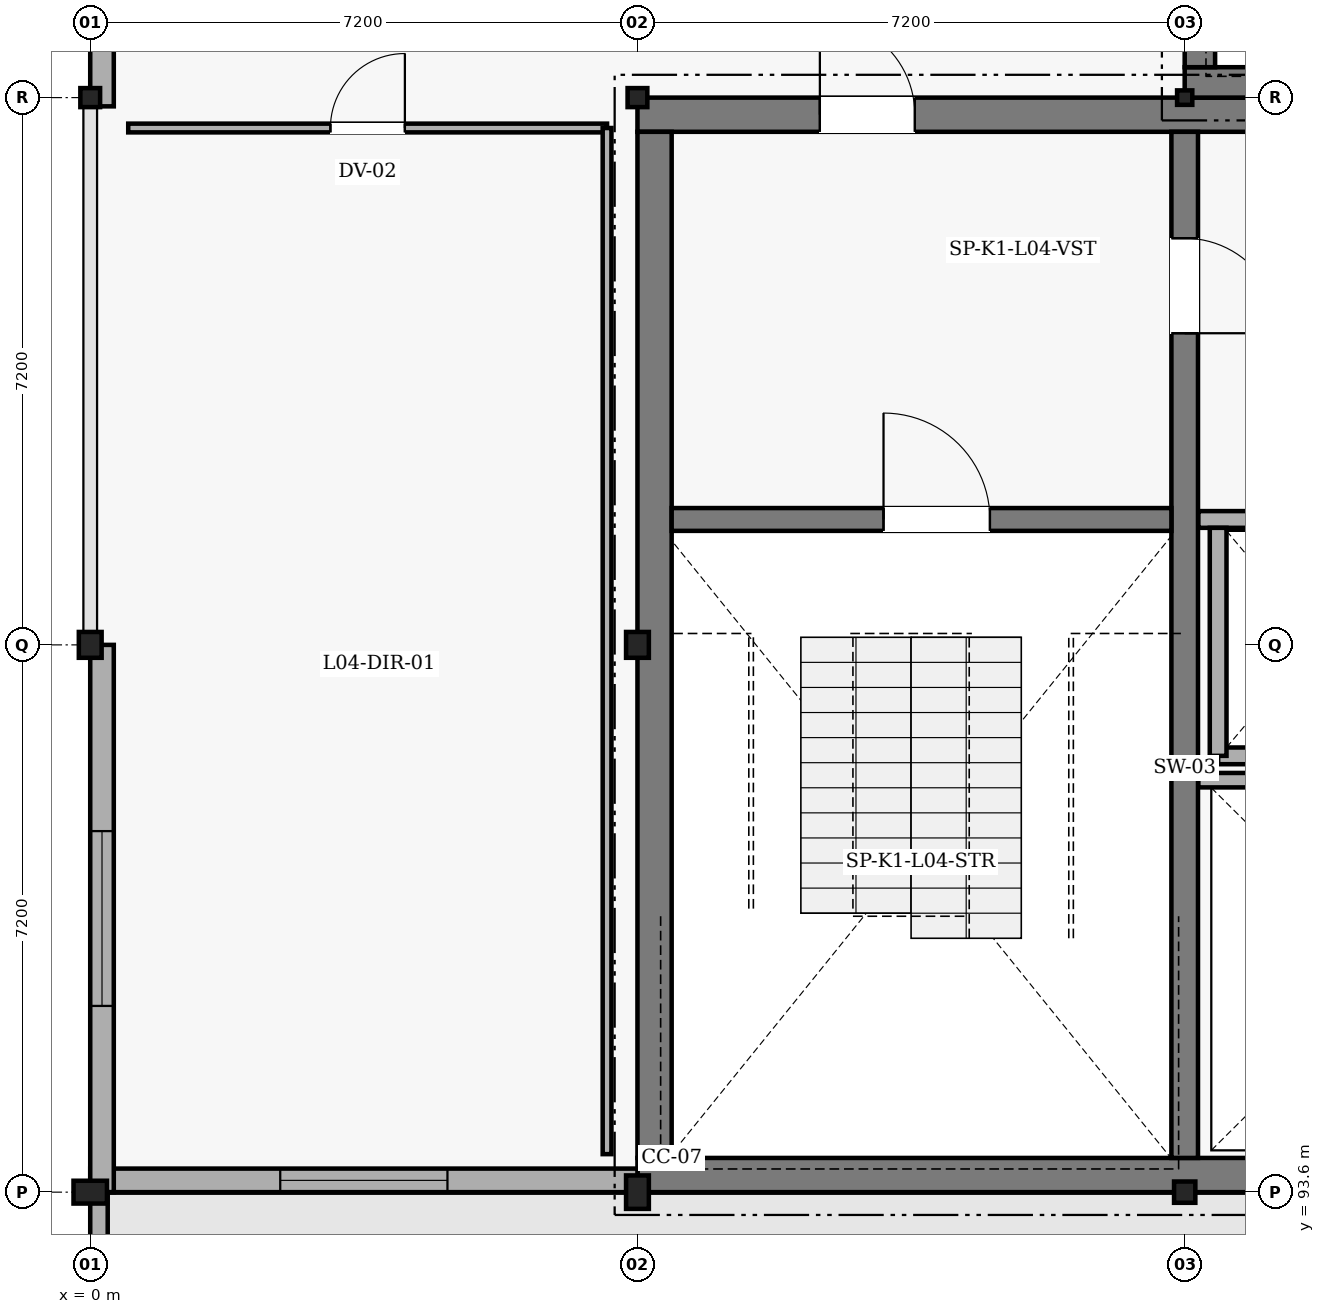
"""IFC4 building model, lengths in metres.
Left out: names, types, materials, properties, quantities, classifications, styles, units other than length and angle.
Written with IfcOpenShell. Run it as: python <this file> out.ifc"""

import sys

from ifc_helpers import new_model, si_unit, direction, frame, frame_2d, origin, origin_2d, place, context, subcontext, project, spatial, rectangle, i_section, extrude, element, fill, save


model = new_model("IFC4")
c1 = context("Model", 3, precision=1e-05, world=origin(), true_north=direction((0.0, 1.0)))
c2 = subcontext(c1, "Body", "Model", "MODEL_VIEW")
j1 = project(units=[si_unit("LENGTHUNIT", "METRE"), si_unit("PLANEANGLEUNIT", "RADIAN")], contexts=[c1])
p1 = place(None, origin())
s1 = spatial("IfcSite", under=j1, at=p1, CompositionType="ELEMENT")
p2 = place(p1, origin())
s2 = spatial("IfcBuilding", under=s1, at=p2, CompositionType="ELEMENT")
p3 = place(p2, frame((0.0, 0.0, 18.0)))
s3 = spatial("IfcBuildingStorey", under=s2, at=p3, CompositionType="ELEMENT", Elevation=18.0)
p4 = place(p3, frame((7.2, 107.775, 0.0), z_axis=(0.0, 0.0, 1.0), x_axis=(1.0, 0.0, 0.0)))
e1 = element("IfcWall", 1, at=p4, inside=s3, PredefinedType="SHEAR", context=c2, shape_type="SweptSolid", body=[
    extrude(rectangle(XDim=14.4, YDim=0.45, at=frame_2d((7.2, 0.0))), origin(), (0.0, 0.0, 1.0), 3.6),
])
p5 = place(p4, frame((2.4, 0.0, 0.0)))
e2 = element("IfcOpeningElement", 2, at=p5, cuts=e1, PredefinedType="OPENING", context=c2, shape_type="SweptSolid", body=[
    extrude(rectangle(XDim=1.25, YDim=2.2, at=frame_2d((0.625, 1.1))), frame((0.0, 0.235, 0.0), z_axis=(0.0, -1.0, 0.0), x_axis=(1.0, 0.0, 0.0)), (0.0, 0.0, 1.0), 0.47),
])
p6 = place(p3, frame((21.6, 93.825, 0.0), z_axis=(0.0, 0.0, 1.0), x_axis=(-1.0, 0.0, 0.0)))
e3 = element("IfcWall", 3, at=p6, inside=s3, PredefinedType="SHEAR", context=c2, shape_type="SweptSolid", body=[
    extrude(rectangle(XDim=14.4, YDim=0.45, at=frame_2d((7.2, 0.0))), origin(), (0.0, 0.0, 1.0), 3.6),
])
p7 = place(p3, frame((7.425, 94.05, 0.0), z_axis=(0.0, 0.0, 1.0), x_axis=(0.0, 1.0, 0.0)))
e4 = element("IfcWall", 4, at=p7, inside=s3, PredefinedType="SHEAR", context=c2, shape_type="SweptSolid", body=[
    extrude(rectangle(XDim=13.5, YDim=0.45, at=frame_2d((6.75, 0.0))), origin(), (0.0, 0.0, 1.0), 3.6),
])
p8 = place(p3, frame((14.4, 107.55, 0.0), z_axis=(0.0, 0.0, 1.0), x_axis=(0.0, -1.0, 0.0)))
e5 = element("IfcWall", 5, at=p8, inside=s3, PredefinedType="SHEAR", context=c2, shape_type="SweptSolid", body=[
    extrude(rectangle(XDim=13.5, YDim=0.35, at=frame_2d((6.75, 0.0))), origin(), (0.0, 0.0, 1.0), 3.6),
])
p9 = place(p8, frame((1.4, 0.0, 0.0)))
e6 = element("IfcOpeningElement", 6, at=p9, cuts=e5, PredefinedType="OPENING", context=c2, shape_type="SweptSolid", body=[
    extrude(rectangle(XDim=1.25, YDim=2.2, at=frame_2d((0.625, 1.1))), frame((0.0, 0.185, 0.0), z_axis=(0.0, -1.0, 0.0), x_axis=(1.0, 0.0, 0.0)), (0.0, 0.0, 1.0), 0.37),
])
p10 = place(p3, frame((7.65, 102.45, 0.0), z_axis=(0.0, 0.0, 1.0), x_axis=(1.0, 0.0, 0.0)))
e7 = element("IfcWall", 7, at=p10, inside=s3, PredefinedType="SHEAR", context=c2, shape_type="SweptSolid", body=[
    extrude(rectangle(XDim=6.575, YDim=0.3, at=frame_2d((3.288, 0.0))), origin(), (0.0, 0.0, 1.0), 3.6),
])
p11 = place(p10, frame((2.788, 0.0, 0.0)))
e8 = element("IfcOpeningElement", 8, at=p11, cuts=e7, PredefinedType="OPENING", context=c2, shape_type="SweptSolid", body=[
    extrude(rectangle(XDim=1.4, YDim=2.2, at=frame_2d((0.7, 1.1))), frame((0.0, 0.16, 0.0), z_axis=(0.0, -1.0, 0.0), x_axis=(1.0, 0.0, 0.0)), (0.0, 0.0, 1.0), 0.32),
])
p12 = place(p3, frame((21.6, 108.2, 0.0), z_axis=(0.0, 0.0, 1.0), x_axis=(-1.0, 0.0, 0.0)))
e9 = element("IfcWall", 9, at=p12, inside=s3, PredefinedType="SHEAR", context=c2, shape_type="SweptSolid", body=[
    extrude(rectangle(XDim=7.2, YDim=0.4, at=frame_2d((3.6, 0.0))), origin(), (0.0, 0.0, 1.0), 3.6),
])
p13 = place(p3, frame((14.6, 108.4, 0.0), z_axis=(0.0, 0.0, 1.0), x_axis=(0.0, 1.0, 0.0)))
e10 = element("IfcWall", 10, at=p13, inside=s3, PredefinedType="SHEAR", context=c2, shape_type="SweptSolid", body=[
    extrude(rectangle(XDim=13.6, YDim=0.4, at=frame_2d((6.8, 0.0))), origin(), (0.0, 0.0, 1.0), 3.6),
])
p14 = place(p13, frame((9.8, 0.0, 0.0)))
e11 = element("IfcOpeningElement", 11, at=p14, cuts=e10, PredefinedType="OPENING", context=c2, shape_type="SweptSolid", body=[
    extrude(rectangle(XDim=1.25, YDim=2.2, at=frame_2d((0.625, 1.1))), frame((0.0, 0.21, 0.0), z_axis=(0.0, -1.0, 0.0), x_axis=(1.0, 0.0, 0.0)), (0.0, 0.0, 1.0), 0.42),
])
p15 = place(p3, frame((0.0, 93.6, 0.0), z_axis=(0.0, 0.0, 1.0), x_axis=(0.0, 1.0, 0.0)))
e12 = element("IfcColumn", 12, at=p15, inside=s3, PredefinedType="COLUMN", context=c2, shape_type="SweptSolid", body=[
    extrude(i_section(OverallWidth=0.3, OverallDepth=0.44, WebThickness=0.011, FlangeThickness=0.021, FilletRadius=0.027, at=origin_2d()), origin(), (0.0, 0.0, 1.0), 3.3),
])
p16 = place(p3, frame((0.0, 100.8, 0.0), z_axis=(0.0, 0.0, 1.0), x_axis=(1.0, 0.0, 0.0)))
e13 = element("IfcColumn", 13, at=p16, inside=s3, PredefinedType="COLUMN", context=c2, shape_type="SweptSolid", body=[
    extrude(i_section(OverallWidth=0.3, OverallDepth=0.34, WebThickness=0.012, FlangeThickness=0.021, FilletRadius=0.027, at=origin_2d()), origin(), (0.0, 0.0, 1.0), 3.3),
])
p17 = place(p3, frame((0.0, 108.0, 0.0), z_axis=(0.0, 0.0, 1.0), x_axis=(1.0, 0.0, 0.0)))
e14 = element("IfcColumn", 14, at=p17, inside=s3, PredefinedType="COLUMN", context=c2, shape_type="SweptSolid", body=[
    extrude(i_section(OverallWidth=0.26, OverallDepth=0.25, WebThickness=0.008, FlangeThickness=0.012, FilletRadius=0.024, at=origin_2d()), origin(), (0.0, 0.0, 1.0), 3.3),
])
p18 = place(p3, frame((7.2, 93.6, 0.0), z_axis=(0.0, 0.0, 1.0), x_axis=(1.0, 0.0, 0.0)))
e15 = element("IfcColumn", 15, at=p18, inside=s3, PredefinedType="COLUMN", context=c2, shape_type="SweptSolid", body=[
    extrude(i_section(OverallWidth=0.3, OverallDepth=0.44, WebThickness=0.011, FlangeThickness=0.021, FilletRadius=0.027, at=origin_2d()), origin(), (0.0, 0.0, 1.0), 3.3),
])
p19 = place(p3, frame((7.2, 100.8, 0.0), z_axis=(0.0, 0.0, 1.0), x_axis=(1.0, 0.0, 0.0)))
e16 = element("IfcColumn", 16, at=p19, inside=s3, PredefinedType="COLUMN", context=c2, shape_type="SweptSolid", body=[
    extrude(i_section(OverallWidth=0.3, OverallDepth=0.34, WebThickness=0.012, FlangeThickness=0.021, FilletRadius=0.027, at=origin_2d()), origin(), (0.0, 0.0, 1.0), 3.3),
])
p20 = place(p3, frame((7.2, 108.0, 0.0), z_axis=(0.0, 0.0, 1.0), x_axis=(1.0, 0.0, 0.0)))
e17 = element("IfcColumn", 17, at=p20, inside=s3, PredefinedType="COLUMN", context=c2, shape_type="SweptSolid", body=[
    extrude(i_section(OverallWidth=0.26, OverallDepth=0.25, WebThickness=0.008, FlangeThickness=0.012, FilletRadius=0.024, at=origin_2d()), origin(), (0.0, 0.0, 1.0), 3.3),
])
p21 = place(p3, frame((14.4, 93.6, 0.0), z_axis=(0.0, 0.0, 1.0), x_axis=(1.0, 0.0, 0.0)))
e18 = element("IfcColumn", 18, at=p21, inside=s3, PredefinedType="COLUMN", context=c2, shape_type="SweptSolid", body=[
    extrude(i_section(OverallWidth=0.28, OverallDepth=0.28, WebThickness=0.01, FlangeThickness=0.018, FilletRadius=0.024, at=origin_2d()), origin(), (0.0, 0.0, 1.0), 3.3),
])
p22 = place(p3, frame((14.4, 108.0, 0.0), z_axis=(0.0, 0.0, 1.0), x_axis=(1.0, 0.0, 0.0)))
e19 = element("IfcColumn", 19, at=p22, inside=s3, PredefinedType="COLUMN", context=c2, shape_type="SweptSolid", body=[
    extrude(i_section(OverallWidth=0.2, OverallDepth=0.19, WebThickness=0.007, FlangeThickness=0.01, FilletRadius=0.018, at=origin_2d()), origin(), (0.0, 0.0, 1.0), 3.3),
])
p23 = place(p3, frame((7.2, 93.755, 0.0), z_axis=(0.0, 0.0, 1.0), x_axis=(-1.0, 0.0, 0.0)))
e20 = element("IfcWall", 20, at=p23, inside=s3, PredefinedType="SOLIDWALL", context=c2, shape_type="SweptSolid", body=[
    extrude(rectangle(XDim=7.2, YDim=0.31, at=frame_2d((3.6, 0.0))), origin(), (0.0, 0.0, 1.0), 3.0),
])
p24 = place(p23, frame((2.5, 0.0, 0.9)))
e21 = element("IfcOpeningElement", 21, at=p24, cuts=e20, PredefinedType="OPENING", context=c2, shape_type="SweptSolid", body=[
    extrude(rectangle(XDim=2.2, YDim=1.7, at=frame_2d((1.1, 0.85))), frame((0.0, 0.165, 0.0), z_axis=(0.0, -1.0, 0.0), x_axis=(1.0, 0.0, 0.0)), (0.0, 0.0, 1.0), 0.33),
])
p25 = place(p3, frame((0.155, 93.6, 0.0), z_axis=(0.0, 0.0, 1.0), x_axis=(0.0, 1.0, 0.0)))
e22 = element("IfcWall", 22, at=p25, inside=s3, PredefinedType="SOLIDWALL", context=c2, shape_type="SweptSolid", body=[
    extrude(rectangle(XDim=7.2, YDim=0.31, at=frame_2d((3.6, 0.0))), origin(), (0.0, 0.0, 1.0), 3.0),
])
p26 = place(p25, frame((2.45, 0.0, 0.9)))
e23 = element("IfcOpeningElement", 23, at=p26, cuts=e22, PredefinedType="OPENING", context=c2, shape_type="SweptSolid", body=[
    extrude(rectangle(XDim=2.3, YDim=1.75, at=frame_2d((1.15, 0.875))), frame((0.0, 0.165, 0.0), z_axis=(0.0, -1.0, 0.0), x_axis=(1.0, 0.0, 0.0)), (0.0, 0.0, 1.0), 0.33),
])
p27 = place(p3, frame((0.155, 107.885, 0.0), z_axis=(0.0, 0.0, 1.0), x_axis=(0.0, 1.0, 0.0)))
e24 = element("IfcWall", 24, at=p27, inside=s3, PredefinedType="SOLIDWALL", context=c2, shape_type="SweptSolid", body=[
    extrude(rectangle(XDim=7.315, YDim=0.31, at=frame_2d((3.657, 0.0))), origin(), (0.0, 0.0, 1.0), 3.0),
])
p28 = place(p27, frame((2.465, 0.0, 0.9)))
e25 = element("IfcOpeningElement", 25, at=p28, cuts=e24, PredefinedType="OPENING", context=c2, shape_type="SweptSolid", body=[
    extrude(rectangle(XDim=2.5, YDim=1.75, at=frame_2d((1.25, 0.875))), frame((0.0, 0.165, 0.0), z_axis=(0.0, -1.0, 0.0), x_axis=(1.0, 0.0, 0.0)), (0.0, 0.0, 1.0), 0.33),
])
p29 = place(p3, frame((0.115, 93.6, 0.0), z_axis=(0.0, 0.0, 1.0), x_axis=(0.0, -1.0, 0.0)))
e26 = element("IfcWall", 26, at=p29, inside=s3, PredefinedType="PARAPET", context=c2, shape_type="SweptSolid", body=[
    extrude(rectangle(XDim=21.6, YDim=0.23, at=frame_2d((10.8, 0.0))), origin(), (0.0, 0.0, 1.0), 0.55),
])
p30 = place(p3, frame((14.58, 99.02, 0.0), z_axis=(0.0, 0.0, 1.0), x_axis=(1.0, 0.0, 0.0)))
e27 = element("IfcWall", 27, at=p30, inside=s3, PredefinedType="PARTITIONING", context=c2, shape_type="SweptSolid", body=[
    extrude(rectangle(XDim=6.57, YDim=0.19, at=frame_2d((3.285, 0.0))), origin(), (0.0, 0.0, 1.0), 3.25),
])
p31 = place(p3, frame((14.58, 102.45, 0.0), z_axis=(0.0, 0.0, 1.0), x_axis=(1.0, 0.0, 0.0)))
e28 = element("IfcWall", 28, at=p31, inside=s3, PredefinedType="PARTITIONING", context=c2, shape_type="SweptSolid", body=[
    extrude(rectangle(XDim=6.57, YDim=0.22, at=frame_2d((3.285, 0.0))), origin(), (0.0, 0.0, 1.0), 3.25),
])
p32 = place(p31, frame((1.02, 0.0, 0.0)))
e29 = element("IfcOpeningElement", 29, at=p32, cuts=e28, PredefinedType="OPENING", context=c2, shape_type="SweptSolid", body=[
    extrude(rectangle(XDim=1.1, YDim=2.15, at=frame_2d((0.55, 1.075))), frame((0.0, 0.12, 0.0), z_axis=(0.0, -1.0, 0.0), x_axis=(1.0, 0.0, 0.0)), (0.0, 0.0, 1.0), 0.24),
])
p33 = place(p31, frame((4.07, 0.0, 0.0)))
e30 = element("IfcOpeningElement", 30, at=p33, cuts=e28, PredefinedType="OPENING", context=c2, shape_type="SweptSolid", body=[
    extrude(rectangle(XDim=1.2, YDim=2.15, at=frame_2d((0.6, 1.075))), frame((0.0, 0.12, 0.0), z_axis=(0.0, -1.0, 0.0), x_axis=(1.0, 0.0, 0.0)), (0.0, 0.0, 1.0), 0.24),
])
p34 = place(p3, frame((14.84, 99.34, 0.0), z_axis=(0.0, 0.0, 1.0), x_axis=(1.0, 0.0, 0.0)))
e31 = element("IfcWall", 31, at=p34, inside=s3, PredefinedType="PARTITIONING", context=c2, shape_type="SweptSolid", body=[
    extrude(rectangle(XDim=2.62, YDim=0.22, at=frame_2d((1.31, 0.0))), origin(), (0.0, 0.0, 1.0), 3.25),
])
p35 = place(p3, frame((14.84, 99.34, 0.0), z_axis=(0.0, 0.0, 1.0), x_axis=(0.0, 1.0, 0.0)))
e32 = element("IfcWall", 32, at=p35, inside=s3, PredefinedType="PARTITIONING", context=c2, shape_type="SweptSolid", body=[
    extrude(rectangle(XDim=3.0, YDim=0.22, at=frame_2d((1.5, 0.0))), origin(), (0.0, 0.0, 1.0), 3.25),
])
p36 = place(p3, frame((0.5, 107.6, 0.0), z_axis=(0.0, 0.0, 1.0), x_axis=(1.0, 0.0, 0.0)))
e33 = element("IfcWall", 33, at=p36, inside=s3, PredefinedType="PARTITIONING", context=c2, shape_type="SweptSolid", body=[
    extrude(rectangle(XDim=6.3, YDim=0.115, at=frame_2d((3.15, 0.0))), origin(), (0.0, 0.0, 1.0), 3.25),
])
p37 = place(p36, frame((2.66, 0.0, 0.0)))
e34 = element("IfcOpeningElement", 34, at=p37, cuts=e33, PredefinedType="OPENING", context=c2, shape_type="SweptSolid", body=[
    extrude(rectangle(XDim=0.98, YDim=2.15, at=frame_2d((0.49, 1.075))), frame((0.0, 0.067, 0.0), z_axis=(0.0, -1.0, 0.0), x_axis=(1.0, 0.0, 0.0)), (0.0, 0.0, 1.0), 0.135),
])
p38 = place(p3, frame((6.8, 107.6, 0.0), z_axis=(0.0, 0.0, 1.0), x_axis=(0.0, -1.0, 0.0)))
e35 = element("IfcWall", 35, at=p38, inside=s3, PredefinedType="PARTITIONING", context=c2, shape_type="SweptSolid", body=[
    extrude(rectangle(XDim=13.5, YDim=0.115, at=frame_2d((6.75, 0.0))), origin(), (0.0, 0.0, 1.0), 2.85),
])
p39 = place(p24, origin())
e36 = element("IfcWindow", 36, at=p39, inside=s3, PartitioningType="SINGLE_PANEL", PredefinedType="WINDOW", context=c2, shape_type="SweptSolid", body=[
    extrude(rectangle(XDim=2.2, YDim=1.7, at=frame_2d((1.1, 0.85))), frame((0.0, 0.03, 0.0), z_axis=(0.0, -1.0, 0.0), x_axis=(1.0, 0.0, 0.0)), (0.0, 0.0, 1.0), 0.06),
])
fill(e21, e36)
p40 = place(p26, origin())
e37 = element("IfcWindow", 37, at=p40, inside=s3, PartitioningType="SINGLE_PANEL", PredefinedType="WINDOW", context=c2, shape_type="SweptSolid", body=[
    extrude(rectangle(XDim=2.3, YDim=1.75, at=frame_2d((1.15, 0.875))), frame((0.0, 0.03, 0.0), z_axis=(0.0, -1.0, 0.0), x_axis=(1.0, 0.0, 0.0)), (0.0, 0.0, 1.0), 0.06),
])
fill(e23, e37)
p41 = place(p11, origin())
e38 = element("IfcDoor", 38, at=p41, inside=s3, OperationType="SINGLE_SWING_LEFT", PredefinedType="DOOR", context=c2, shape_type="SweptSolid", body=[
    extrude(rectangle(XDim=1.4, YDim=2.2, at=frame_2d((0.7, 1.1))), frame((0.0, 0.025, 0.0), z_axis=(0.0, -1.0, 0.0), x_axis=(1.0, 0.0, 0.0)), (0.0, 0.0, 1.0), 0.05),
])
fill(e8, e38)
p42 = place(p9, origin())
e39 = element("IfcDoor", 39, at=p42, inside=s3, OperationType="SINGLE_SWING_RIGHT", PredefinedType="DOOR", context=c2, shape_type="SweptSolid", body=[
    extrude(rectangle(XDim=1.25, YDim=2.2, at=frame_2d((0.625, 1.1))), frame((0.0, 0.025, 0.0), z_axis=(0.0, -1.0, 0.0), x_axis=(1.0, 0.0, 0.0)), (0.0, 0.0, 1.0), 0.05),
])
fill(e6, e39)
p43 = place(p5, origin())
e40 = element("IfcDoor", 40, at=p43, inside=s3, OperationType="SINGLE_SWING_LEFT", PredefinedType="DOOR", context=c2, shape_type="SweptSolid", body=[
    extrude(rectangle(XDim=1.25, YDim=2.2, at=frame_2d((0.625, 1.1))), frame((0.0, 0.025, 0.0), z_axis=(0.0, -1.0, 0.0), x_axis=(1.0, 0.0, 0.0)), (0.0, 0.0, 1.0), 0.05),
])
fill(e2, e40)
p44 = place(p37, origin())
e41 = element("IfcDoor", 41, at=p44, inside=s3, OperationType="SINGLE_SWING_RIGHT", PredefinedType="DOOR", context=c2, shape_type="SweptSolid", body=[
    extrude(rectangle(XDim=0.98, YDim=2.15, at=frame_2d((0.49, 1.075))), frame((0.0, 0.025, 0.0), z_axis=(0.0, -1.0, 0.0), x_axis=(1.0, 0.0, 0.0)), (0.0, 0.0, 1.0), 0.05),
])
fill(e34, e41)
save(model, sys.argv[1])
